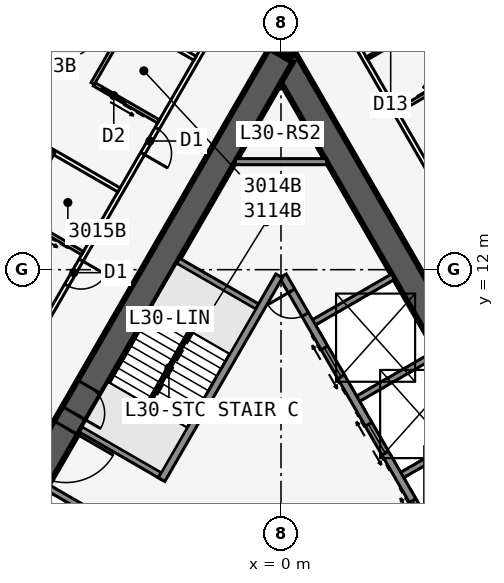
"""IFC4 building model, lengths in metres.
Left out: names, types, materials, properties, quantities, classifications, styles, units other than length and angle.
Written with IfcOpenShell. Run it as: python <this file> out.ifc"""

import sys

from ifc_helpers import new_model, si_unit, direction, frame, frame_2d, origin, place, context, subcontext, project, spatial, rectangle, extrude, element, fill, save


model = new_model("IFC4")
c1 = context("Model", 3, precision=1e-05, world=origin(), true_north=direction((0.0, 1.0)))
c2 = subcontext(c1, "Body", "Model", "MODEL_VIEW")
j1 = project(units=[si_unit("LENGTHUNIT", "METRE"), si_unit("PLANEANGLEUNIT", "RADIAN")], contexts=[c1])
p1 = place(None, origin())
s1 = spatial("IfcSite", under=j1, at=p1, CompositionType="ELEMENT")
p2 = place(p1, origin())
s2 = spatial("IfcBuilding", under=s1, at=p2, CompositionType="ELEMENT")
p3 = place(p2, frame((0.0, 0.0, 118.1)))
s3 = spatial("IfcBuildingStorey", under=s2, at=p3, CompositionType="ELEMENT", Elevation=118.1)
p4 = place(p3, frame((16.5, -9.526, 0.0), z_axis=(0.0, 0.0, 1.0), x_axis=(-0.499999749417, 0.866025548458, 0.0)))
e1 = element("IfcWall", 1, at=p4, inside=s3, PredefinedType="SHEAR", context=c2, shape_type="SweptSolid", body=[
    extrude(rectangle(XDim=33.0, YDim=0.9, at=frame_2d((16.5, 0.0))), origin(), (0.0, 0.0, 1.0), 3.4),
])
p5 = place(p4, frame((14.15, 0.0, 0.0)))
e2 = element("IfcOpeningElement", 2, at=p5, cuts=e1, PredefinedType="OPENING", context=c2, shape_type="SweptSolid", body=[
    extrude(rectangle(XDim=1.8, YDim=2.13, at=frame_2d((0.9, 1.065))), frame((0.0, 0.46, 0.0), z_axis=(0.0, -1.0, 0.0), x_axis=(1.0, 0.0, 0.0)), (0.0, 0.0, 1.0), 0.92),
])
p6 = place(p4, frame((12.6, 0.0, 0.0)))
e3 = element("IfcOpeningElement", 3, at=p6, cuts=e1, PredefinedType="OPENING", context=c2, shape_type="SweptSolid", body=[
    extrude(rectangle(XDim=1.0, YDim=2.13, at=frame_2d((0.5, 1.065))), frame((0.0, 0.46, 0.0), z_axis=(0.0, -1.0, 0.0), x_axis=(1.0, 0.0, 0.0)), (0.0, 0.0, 1.0), 0.92),
])
p7 = place(p3, frame((5.379, 2.586, 0.0), z_axis=(0.0, 0.0, 1.0), x_axis=(-0.500001375892, 0.866024609411, 0.0)))
e4 = element("IfcWall", 4, at=p7, inside=s3, PredefinedType="SOLIDWALL", context=c2, shape_type="SweptSolid", body=[
    extrude(rectangle(XDim=10.633, YDim=0.25, at=frame_2d((5.316, 0.0))), origin(), (0.0, 0.0, 1.0), 3.235),
])
p8 = place(p7, frame((9.164, 0.0, 0.0)))
e5 = element("IfcOpeningElement", 5, at=p8, cuts=e4, PredefinedType="OPENING", context=c2, shape_type="SweptSolid", body=[
    extrude(rectangle(XDim=0.9, YDim=2.13, at=frame_2d((0.45, 1.065))), frame((0.0, 0.135, 0.0), z_axis=(0.0, -1.0, 0.0), x_axis=(1.0, 0.0, 0.0)), (0.0, 0.0, 1.0), 0.27),
])
p9 = place(p7, frame((1.0, 0.0, 0.0)))
e6 = element("IfcOpeningElement", 6, at=p9, cuts=e4, PredefinedType="OPENING", context=c2, shape_type="SweptSolid", body=[
    extrude(rectangle(XDim=1.1, YDim=2.13, at=frame_2d((0.55, 1.065))), frame((0.0, 0.135, 0.0), z_axis=(0.0, -1.0, 0.0), x_axis=(1.0, 0.0, 0.0)), (0.0, 0.0, 1.0), 0.27),
])
p10 = place(p7, frame((3.9, 0.0, 0.0)))
e7 = element("IfcOpeningElement", 7, at=p10, cuts=e4, PredefinedType="OPENING", context=c2, shape_type="SweptSolid", body=[
    extrude(rectangle(XDim=1.1, YDim=2.13, at=frame_2d((0.55, 1.065))), frame((0.0, 0.135, 0.0), z_axis=(0.0, -1.0, 0.0), x_axis=(1.0, 0.0, 0.0)), (0.0, 0.0, 1.0), 0.27),
])
p11 = place(p7, frame((6.8, 0.0, 0.0)))
e8 = element("IfcOpeningElement", 8, at=p11, cuts=e4, PredefinedType="OPENING", context=c2, shape_type="SweptSolid", body=[
    extrude(rectangle(XDim=1.1, YDim=2.13, at=frame_2d((0.55, 1.065))), frame((0.0, 0.135, 0.0), z_axis=(0.0, -1.0, 0.0), x_axis=(1.0, 0.0, 0.0)), (0.0, 0.0, 1.0), 0.27),
])
for number, where, z_axis, x_axis in (
    (9, (3.879, 5.184, 0.0), (0.0, 0.0, 1.0), (0.866, 0.5, 0.0)),
    (10, (2.429, 7.696, 0.0), (0.0, 0.0, 1.0), (0.866, 0.5, 0.0)),
    (11, (0.979, 10.207, 0.0), (0.0, 0.0, 1.0), (0.866, 0.5, 0.0)),
):
    element("IfcWall", number, at=place(p3, frame(where, z_axis=z_axis, x_axis=x_axis)), inside=s3, PredefinedType="SOLIDWALL", context=c2, shape_type="SweptSolid", body=[
        extrude(rectangle(XDim=3.125, YDim=0.2, at=frame_2d((1.562, 0.0))), origin(), (0.0, 0.0, 1.0), 3.235),
    ])
p12 = place(p3, frame((0.0, 19.052, 0.0), z_axis=(0.0, 0.0, 1.0), x_axis=(-0.499999749417, -0.866025548458, 0.0)))
e12 = element("IfcWall", 12, at=p12, inside=s3, PredefinedType="SHEAR", context=c2, shape_type="SweptSolid", body=[
    extrude(rectangle(XDim=33.0, YDim=0.9, at=frame_2d((16.5, 0.0))), origin(), (0.0, 0.0, 1.0), 3.4),
])
p13 = place(p12, frame((14.15, 0.0, 0.0)))
e13 = element("IfcOpeningElement", 13, at=p13, cuts=e12, PredefinedType="OPENING", context=c2, shape_type="SweptSolid", body=[
    extrude(rectangle(XDim=1.8, YDim=2.13, at=frame_2d((0.9, 1.065))), frame((0.0, 0.46, 0.0), z_axis=(0.0, -1.0, 0.0), x_axis=(1.0, 0.0, 0.0)), (0.0, 0.0, 1.0), 0.92),
])
p14 = place(p12, frame((12.6, 0.0, 0.0)))
e14 = element("IfcOpeningElement", 14, at=p14, cuts=e12, PredefinedType="OPENING", context=c2, shape_type="SweptSolid", body=[
    extrude(rectangle(XDim=1.0, YDim=2.13, at=frame_2d((0.5, 1.065))), frame((0.0, 0.46, 0.0), z_axis=(0.0, -1.0, 0.0), x_axis=(1.0, 0.0, 0.0)), (0.0, 0.0, 1.0), 0.92),
])
p15 = place(p3, frame((-0.062, 11.794, 0.0), z_axis=(0.0, 0.0, 1.0), x_axis=(-0.500006680225, -0.86602154692, 0.0)))
e15 = element("IfcWall", 15, at=p15, inside=s3, PredefinedType="SOLIDWALL", context=c2, shape_type="SweptSolid", body=[
    extrude(rectangle(XDim=7.733, YDim=0.25, at=frame_2d((3.866, 0.0))), origin(), (0.0, 0.0, 1.0), 3.235),
])
for number, where, z_axis, x_axis in (
    (16, (-0.679, 10.727, 0.0), (0.0, 0.0, 1.0), (-0.866, 0.5, 0.0)),
    (17, (-3.879, 5.184, 0.0), (0.0, 0.0, 1.0), (-0.866, 0.5, 0.0)),
    (18, (-4.979, 3.279, 0.0), (0.0, 0.0, 1.0), (-0.866, 0.5, 0.0)),
):
    element("IfcWall", number, at=place(p3, frame(where, z_axis=z_axis, x_axis=x_axis)), inside=s3, PredefinedType="SOLIDWALL", context=c2, shape_type="SweptSolid", body=[
        extrude(rectangle(XDim=3.125, YDim=0.2, at=frame_2d((1.562, 0.0))), origin(), (0.0, 0.0, 1.0), 3.235),
    ])
p16 = place(p3, frame((0.0, 19.052, 0.0), z_axis=(0.0, 0.0, 1.0), x_axis=(0.0, 1.0, 0.0)))
e19 = element("IfcWall", 19, at=p16, inside=s3, PredefinedType="SHEAR", context=c2, shape_type="SweptSolid", body=[
    extrude(rectangle(XDim=4.746, YDim=0.9, at=frame_2d((2.373, 0.0))), origin(), (0.0, 0.0, 1.0), 3.4),
])
p17 = place(p16, frame((1.8, 0.0, 0.0)))
e20 = element("IfcOpeningElement", 20, at=p17, cuts=e19, PredefinedType="OPENING", context=c2, shape_type="SweptSolid", body=[
    extrude(rectangle(XDim=1.8, YDim=2.13, at=frame_2d((0.9, 1.065))), frame((0.0, 0.46, 0.0), z_axis=(0.0, -1.0, 0.0), x_axis=(1.0, 0.0, 0.0)), (0.0, 0.0, 1.0), 0.92),
])
p18 = place(p3, frame((20.027, -10.985, 0.0), z_axis=(0.0, 0.0, 1.0), x_axis=(-0.500001677587, 0.866024435227, 0.0)))
e21 = element("IfcWall", 21, at=p18, inside=s3, PredefinedType="PARTITIONING", context=c2, shape_type="SweptSolid", body=[
    extrude(rectangle(XDim=39.054, YDim=0.15, at=frame_2d((19.527, 0.0))), origin(), (0.0, 0.0, 1.0), 3.235),
])
p19 = place(p18, frame((0.352, 0.0, 0.0)))
e22 = element("IfcOpeningElement", 22, at=p19, cuts=e21, PredefinedType="OPENING", context=c2, shape_type="SweptSolid", body=[
    extrude(rectangle(XDim=0.95, YDim=2.13, at=frame_2d((0.475, 1.065))), frame((0.0, 0.085, 0.0), z_axis=(0.0, -1.0, 0.0), x_axis=(1.0, 0.0, 0.0)), (0.0, 0.0, 1.0), 0.17),
])
p20 = place(p18, frame((7.752, 0.0, 0.0)))
e23 = element("IfcOpeningElement", 23, at=p20, cuts=e21, PredefinedType="OPENING", context=c2, shape_type="SweptSolid", body=[
    extrude(rectangle(XDim=0.95, YDim=2.13, at=frame_2d((0.475, 1.065))), frame((0.0, 0.085, 0.0), z_axis=(0.0, -1.0, 0.0), x_axis=(1.0, 0.0, 0.0)), (0.0, 0.0, 1.0), 0.17),
])
p21 = place(p18, frame((17.752, 0.0, 0.0)))
e24 = element("IfcOpeningElement", 24, at=p21, cuts=e21, PredefinedType="OPENING", context=c2, shape_type="SweptSolid", body=[
    extrude(rectangle(XDim=0.95, YDim=2.13, at=frame_2d((0.475, 1.065))), frame((0.0, 0.085, 0.0), z_axis=(0.0, -1.0, 0.0), x_axis=(1.0, 0.0, 0.0)), (0.0, 0.0, 1.0), 0.17),
])
p22 = place(p18, frame((22.152, 0.0, 0.0)))
e25 = element("IfcOpeningElement", 25, at=p22, cuts=e21, PredefinedType="OPENING", context=c2, shape_type="SweptSolid", body=[
    extrude(rectangle(XDim=0.95, YDim=2.13, at=frame_2d((0.475, 1.065))), frame((0.0, 0.085, 0.0), z_axis=(0.0, -1.0, 0.0), x_axis=(1.0, 0.0, 0.0)), (0.0, 0.0, 1.0), 0.17),
])
p23 = place(p18, frame((27.152, 0.0, 0.0)))
e26 = element("IfcOpeningElement", 26, at=p23, cuts=e21, PredefinedType="OPENING", context=c2, shape_type="SweptSolid", body=[
    extrude(rectangle(XDim=0.95, YDim=2.13, at=frame_2d((0.475, 1.065))), frame((0.0, 0.085, 0.0), z_axis=(0.0, -1.0, 0.0), x_axis=(1.0, 0.0, 0.0)), (0.0, 0.0, 1.0), 0.17),
])
p24 = place(p18, frame((36.546, 0.0, 0.0)))
e27 = element("IfcOpeningElement", 27, at=p24, cuts=e21, PredefinedType="OPENING", context=c2, shape_type="SweptSolid", body=[
    extrude(rectangle(XDim=0.95, YDim=2.13, at=frame_2d((0.475, 1.065))), frame((0.0, 0.085, 0.0), z_axis=(0.0, -1.0, 0.0), x_axis=(1.0, 0.0, 0.0)), (0.0, 0.0, 1.0), 0.17),
])
p25 = place(p3, frame((2.829, 18.954, 0.0), z_axis=(0.0, 0.0, 1.0), x_axis=(0.866015739374, 0.500016738876, 0.0)))
e28 = element("IfcWall", 28, at=p25, inside=s3, PredefinedType="PARTITIONING", context=c2, shape_type="SweptSolid", body=[
    extrude(rectangle(XDim=7.516, YDim=0.1, at=frame_2d((3.758, 0.0))), origin(), (0.0, 0.0, 1.0), 2.389),
])
p26 = place(p25, frame((0.45, 0.0, 0.0)))
e29 = element("IfcOpeningElement", 29, at=p26, cuts=e28, PredefinedType="OPENING", context=c2, shape_type="SweptSolid", body=[
    extrude(rectangle(XDim=0.9, YDim=2.13, at=frame_2d((0.45, 1.065))), frame((0.0, 0.06, 0.0), z_axis=(0.0, -1.0, 0.0), x_axis=(1.0, 0.0, 0.0)), (0.0, 0.0, 1.0), 0.12),
])
p27 = place(p3, frame((3.829, 17.221, 0.0), z_axis=(0.0, 0.0, 1.0), x_axis=(0.865997131366, 0.500048966069, 0.0)))
e30 = element("IfcWall", 30, at=p27, inside=s3, PredefinedType="PLUMBINGWALL", context=c2, shape_type="SweptSolid", body=[
    extrude(rectangle(XDim=2.74, YDim=0.12, at=frame_2d((1.37, 0.0))), origin(), (0.0, 0.0, 1.0), 3.235),
])
p28 = place(p27, frame((1.55, 0.0, 0.0)))
e31 = element("IfcOpeningElement", 31, at=p28, cuts=e30, PredefinedType="OPENING", context=c2, shape_type="SweptSolid", body=[
    extrude(rectangle(XDim=0.9, YDim=2.13, at=frame_2d((0.45, 1.065))), frame((0.0, 0.07, 0.0), z_axis=(0.0, -1.0, 0.0), x_axis=(1.0, 0.0, 0.0)), (0.0, 0.0, 1.0), 0.14),
])
p29 = place(p3, frame((-0.5, 22.836, 0.0), z_axis=(0.0, 0.0, 1.0), x_axis=(-0.500001677587, -0.866024435227, 0.0)))
e32 = element("IfcWall", 32, at=p29, inside=s3, PredefinedType="PARTITIONING", context=c2, shape_type="SweptSolid", body=[
    extrude(rectangle(XDim=39.054, YDim=0.15, at=frame_2d((19.527, 0.0))), origin(), (0.0, 0.0, 1.0), 3.235),
])
p30 = place(p29, frame((0.352, 0.0, 0.0)))
e33 = element("IfcOpeningElement", 33, at=p30, cuts=e32, PredefinedType="OPENING", context=c2, shape_type="SweptSolid", body=[
    extrude(rectangle(XDim=0.95, YDim=2.13, at=frame_2d((0.475, 1.065))), frame((0.0, 0.085, 0.0), z_axis=(0.0, -1.0, 0.0), x_axis=(1.0, 0.0, 0.0)), (0.0, 0.0, 1.0), 0.17),
])
p31 = place(p29, frame((7.152, 0.0, 0.0)))
e34 = element("IfcOpeningElement", 34, at=p31, cuts=e32, PredefinedType="OPENING", context=c2, shape_type="SweptSolid", body=[
    extrude(rectangle(XDim=0.95, YDim=2.13, at=frame_2d((0.475, 1.065))), frame((0.0, 0.085, 0.0), z_axis=(0.0, -1.0, 0.0), x_axis=(1.0, 0.0, 0.0)), (0.0, 0.0, 1.0), 0.17),
])
p32 = place(p29, frame((12.152, 0.0, 0.0)))
e35 = element("IfcOpeningElement", 35, at=p32, cuts=e32, PredefinedType="OPENING", context=c2, shape_type="SweptSolid", body=[
    extrude(rectangle(XDim=0.95, YDim=2.13, at=frame_2d((0.475, 1.065))), frame((0.0, 0.085, 0.0), z_axis=(0.0, -1.0, 0.0), x_axis=(1.0, 0.0, 0.0)), (0.0, 0.0, 1.0), 0.17),
])
p33 = place(p29, frame((17.152, 0.0, 0.0)))
e36 = element("IfcOpeningElement", 36, at=p33, cuts=e32, PredefinedType="OPENING", context=c2, shape_type="SweptSolid", body=[
    extrude(rectangle(XDim=0.95, YDim=2.13, at=frame_2d((0.475, 1.065))), frame((0.0, 0.085, 0.0), z_axis=(0.0, -1.0, 0.0), x_axis=(1.0, 0.0, 0.0)), (0.0, 0.0, 1.0), 0.17),
])
p34 = place(p29, frame((22.752, 0.0, 0.0)))
e37 = element("IfcOpeningElement", 37, at=p34, cuts=e32, PredefinedType="OPENING", context=c2, shape_type="SweptSolid", body=[
    extrude(rectangle(XDim=0.95, YDim=2.13, at=frame_2d((0.475, 1.065))), frame((0.0, 0.085, 0.0), z_axis=(0.0, -1.0, 0.0), x_axis=(1.0, 0.0, 0.0)), (0.0, 0.0, 1.0), 0.17),
])
p35 = place(p29, frame((32.152, 0.0, 0.0)))
e38 = element("IfcOpeningElement", 38, at=p35, cuts=e32, PredefinedType="OPENING", context=c2, shape_type="SweptSolid", body=[
    extrude(rectangle(XDim=0.95, YDim=2.13, at=frame_2d((0.475, 1.065))), frame((0.0, 0.085, 0.0), z_axis=(0.0, -1.0, 0.0), x_axis=(1.0, 0.0, 0.0)), (0.0, 0.0, 1.0), 0.17),
])
p36 = place(p29, frame((37.752, 0.0, 0.0)))
e39 = element("IfcOpeningElement", 39, at=p36, cuts=e32, PredefinedType="OPENING", context=c2, shape_type="SweptSolid", body=[
    extrude(rectangle(XDim=0.95, YDim=2.13, at=frame_2d((0.475, 1.065))), frame((0.0, 0.085, 0.0), z_axis=(0.0, -1.0, 0.0), x_axis=(1.0, 0.0, 0.0)), (0.0, 0.0, 1.0), 0.17),
])
p37 = place(p3, frame((-2.829, 18.954, 0.0), z_axis=(0.0, 0.0, 1.0), x_axis=(-0.866015739374, 0.500016738876, 0.0)))
e40 = element("IfcWall", 40, at=p37, inside=s3, PredefinedType="PARTITIONING", context=c2, shape_type="SweptSolid", body=[
    extrude(rectangle(XDim=7.516, YDim=0.15, at=frame_2d((3.758, 0.0))), origin(), (0.0, 0.0, 1.0), 2.389),
])
p38 = place(p3, frame((-5.329, 14.623, 0.0), z_axis=(0.0, 0.0, 1.0), x_axis=(-0.866011723728, 0.500023693804, 0.0)))
e41 = element("IfcWall", 41, at=p38, inside=s3, PredefinedType="PARTITIONING", context=c2, shape_type="SweptSolid", body=[
    extrude(rectangle(XDim=8.395, YDim=0.15, at=frame_2d((4.198, 0.0))), origin(), (0.0, 0.0, 1.0), 2.389),
])
p39 = place(p3, frame((-4.993, 20.204, 0.0), z_axis=(0.0, 0.0, 1.0), x_axis=(-0.500033551112, -0.866006032174, 0.0)))
e42 = element("IfcWall", 42, at=p39, inside=s3, PredefinedType="PLUMBINGWALL", context=c2, shape_type="SweptSolid", body=[
    extrude(rectangle(XDim=2.4, YDim=0.12, at=frame_2d((1.2, 0.0))), origin(), (0.0, 0.0, 1.0), 3.235),
])
p40 = place(p3, frame((-4.029, 16.875, 0.0), z_axis=(0.0, 0.0, 1.0), x_axis=(-0.865980627057, 0.500077547548, 0.0)))
e43 = element("IfcWall", 43, at=p40, inside=s3, PredefinedType="PLUMBINGWALL", context=c2, shape_type="SweptSolid", body=[
    extrude(rectangle(XDim=2.44, YDim=0.12, at=frame_2d((1.22, 0.0))), origin(), (0.0, 0.0, 1.0), 3.235),
])
p41 = place(p40, frame((1.25, 0.0, 0.0)))
e44 = element("IfcOpeningElement", 44, at=p41, cuts=e43, PredefinedType="OPENING", context=c2, shape_type="SweptSolid", body=[
    extrude(rectangle(XDim=0.9, YDim=2.13, at=frame_2d((0.45, 1.065))), frame((0.0, 0.07, 0.0), z_axis=(0.0, -1.0, 0.0), x_axis=(1.0, 0.0, 0.0)), (0.0, 0.0, 1.0), 0.14),
])
p42 = place(p3, frame((-7.493, 15.873, 0.0), z_axis=(0.0, 0.0, 1.0), x_axis=(-0.500077600433, -0.865980596518, 0.0)))
e45 = element("IfcWall", 45, at=p42, inside=s3, PredefinedType="PLUMBINGWALL", context=c2, shape_type="SweptSolid", body=[
    extrude(rectangle(XDim=2.4, YDim=0.12, at=frame_2d((1.2, 0.0))), origin(), (0.0, 0.0, 1.0), 3.235),
])
p43 = place(p3, frame((-6.529, 12.545, 0.0), z_axis=(0.0, 0.0, 1.0), x_axis=(-0.866023955769, 0.500002508028, 0.0)))
e46 = element("IfcWall", 46, at=p43, inside=s3, PredefinedType="PLUMBINGWALL", context=c2, shape_type="SweptSolid", body=[
    extrude(rectangle(XDim=2.44, YDim=0.12, at=frame_2d((1.22, 0.0))), origin(), (0.0, 0.0, 1.0), 3.235),
])
p44 = place(p43, frame((1.25, 0.0, 0.0)))
e47 = element("IfcOpeningElement", 47, at=p44, cuts=e46, PredefinedType="OPENING", context=c2, shape_type="SweptSolid", body=[
    extrude(rectangle(XDim=0.9, YDim=2.13, at=frame_2d((0.45, 1.065))), frame((0.0, 0.07, 0.0), z_axis=(0.0, -1.0, 0.0), x_axis=(1.0, 0.0, 0.0)), (0.0, 0.0, 1.0), 0.14),
])
p45 = place(p3, frame((-1.501, 15.552, 0.0), z_axis=(0.0, 0.0, 1.0), x_axis=(1.0, 0.0, 0.0)))
e48 = element("IfcWall", 48, at=p45, inside=s3, PredefinedType="SOLIDWALL", context=c2, shape_type="SweptSolid", body=[
    extrude(rectangle(XDim=3.002, YDim=0.2, at=frame_2d((1.501, 0.0))), origin(), (0.0, 0.0, 1.0), 3.235),
])
p46 = place(p3, frame((-2.988, 9.978, 0.0), z_axis=(0.0, 0.0, 1.0), x_axis=(-0.499992232847, -0.866029888106, 0.0)))
e49 = element("IfcWall", 49, at=p46, inside=s3, PredefinedType="SOLIDWALL", context=c2, shape_type="SweptSolid", body=[
    extrude(rectangle(XDim=2.794, YDim=0.1, at=frame_2d((1.397, 0.0))), origin(), (0.0, 0.0, 1.0), 3.4),
])
p47 = place(p41, origin())
e50 = element("IfcDoor", 50, at=p47, inside=s3, OperationType="SLIDING_TO_LEFT", PredefinedType="DOOR", context=c2, shape_type="SweptSolid", body=[
    extrude(rectangle(XDim=0.9, YDim=2.13, at=frame_2d((0.45, 1.065))), frame((0.0, 0.025, 0.0), z_axis=(0.0, -1.0, 0.0), x_axis=(1.0, 0.0, 0.0)), (0.0, 0.0, 1.0), 0.05),
])
fill(e44, e50)
p48 = place(p31, origin())
e51 = element("IfcDoor", 51, at=p48, inside=s3, OperationType="SINGLE_SWING_RIGHT", PredefinedType="DOOR", context=c2, shape_type="SweptSolid", body=[
    extrude(rectangle(XDim=0.95, YDim=2.13, at=frame_2d((0.475, 1.065))), frame((0.0, 0.025, 0.0), z_axis=(0.0, -1.0, 0.0), x_axis=(1.0, 0.0, 0.0)), (0.0, 0.0, 1.0), 0.05),
])
fill(e34, e51)
p49 = place(p32, origin())
e52 = element("IfcDoor", 52, at=p49, inside=s3, OperationType="SINGLE_SWING_LEFT", PredefinedType="DOOR", context=c2, shape_type="SweptSolid", body=[
    extrude(rectangle(XDim=0.95, YDim=2.13, at=frame_2d((0.475, 1.065))), frame((0.0, 0.025, 0.0), z_axis=(0.0, -1.0, 0.0), x_axis=(1.0, 0.0, 0.0)), (0.0, 0.0, 1.0), 0.05),
])
fill(e35, e52)
p50 = place(p13, origin())
e53 = element("IfcDoor", 53, at=p50, inside=s3, OperationType="DOUBLE_DOOR_SINGLE_SWING", PredefinedType="DOOR", context=c2, shape_type="SweptSolid", body=[
    extrude(rectangle(XDim=1.8, YDim=2.13, at=frame_2d((0.9, 1.065))), frame((0.0, 0.025, 0.0), z_axis=(0.0, -1.0, 0.0), x_axis=(1.0, 0.0, 0.0)), (0.0, 0.0, 1.0), 0.05),
])
fill(e13, e53)
p51 = place(p14, origin())
e54 = element("IfcDoor", 54, at=p51, inside=s3, OperationType="SINGLE_SWING_RIGHT", PredefinedType="DOOR", context=c2, shape_type="SweptSolid", body=[
    extrude(rectangle(XDim=1.0, YDim=2.13, at=frame_2d((0.5, 1.065))), frame((0.0, 0.025, 0.0), z_axis=(0.0, -1.0, 0.0), x_axis=(1.0, 0.0, 0.0)), (0.0, 0.0, 1.0), 0.05),
])
fill(e14, e54)
p52 = place(p8, origin())
e55 = element("IfcDoor", 55, at=p52, inside=s3, OperationType="SINGLE_SWING_RIGHT", PredefinedType="DOOR", context=c2, shape_type="SweptSolid", body=[
    extrude(rectangle(XDim=0.9, YDim=2.13, at=frame_2d((0.45, 1.065))), frame((0.0, 0.025, 0.0), z_axis=(0.0, -1.0, 0.0), x_axis=(1.0, 0.0, 0.0)), (0.0, 0.0, 1.0), 0.05),
])
fill(e5, e55)
p53 = place(p9, origin())
e56 = element("IfcDoor", 56, at=p53, inside=s3, OperationType="DOUBLE_DOOR_SLIDING", PredefinedType="USERDEFINED", context=c2, shape_type="SweptSolid", body=[
    extrude(rectangle(XDim=1.1, YDim=2.13, at=frame_2d((0.55, 1.065))), frame((0.0, 0.025, 0.0), z_axis=(0.0, -1.0, 0.0), x_axis=(1.0, 0.0, 0.0)), (0.0, 0.0, 1.0), 0.05),
])
fill(e6, e56)
p54 = place(p10, origin())
e57 = element("IfcDoor", 57, at=p54, inside=s3, OperationType="DOUBLE_DOOR_SLIDING", PredefinedType="USERDEFINED", context=c2, shape_type="SweptSolid", body=[
    extrude(rectangle(XDim=1.1, YDim=2.13, at=frame_2d((0.55, 1.065))), frame((0.0, 0.025, 0.0), z_axis=(0.0, -1.0, 0.0), x_axis=(1.0, 0.0, 0.0)), (0.0, 0.0, 1.0), 0.05),
])
fill(e7, e57)
p55 = place(p11, origin())
e58 = element("IfcDoor", 58, at=p55, inside=s3, OperationType="DOUBLE_DOOR_SLIDING", PredefinedType="USERDEFINED", context=c2, shape_type="SweptSolid", body=[
    extrude(rectangle(XDim=1.1, YDim=2.13, at=frame_2d((0.55, 1.065))), frame((0.0, 0.025, 0.0), z_axis=(0.0, -1.0, 0.0), x_axis=(1.0, 0.0, 0.0)), (0.0, 0.0, 1.0), 0.05),
])
fill(e8, e58)
save(model, sys.argv[1])
